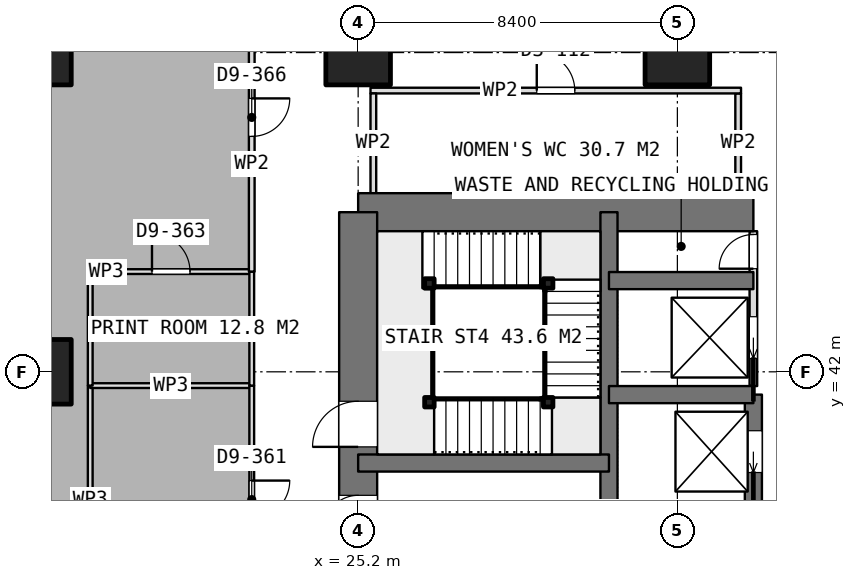
"""IFC4 building model, lengths in metres.
Left out: names, types, materials, properties, quantities, classifications, styles, units other than length and angle.
Written with IfcOpenShell. Run it as: python <this file> out.ifc"""

import sys

from ifc_helpers import new_model, si_unit, direction, frame, frame_2d, origin, origin_2d, place, context, subcontext, project, spatial, rectangle, extrude, element, fill, save


model = new_model("IFC4")
c1 = context("Model", 3, precision=1e-05, world=origin(), true_north=direction((0.0, 1.0)))
c2 = subcontext(c1, "Body", "Model", "MODEL_VIEW")
j1 = project(units=[si_unit("LENGTHUNIT", "METRE"), si_unit("PLANEANGLEUNIT", "RADIAN")], contexts=[c1])
p1 = place(None, origin())
s1 = spatial("IfcSite", under=j1, at=p1, CompositionType="ELEMENT")
p2 = place(p1, origin())
s2 = spatial("IfcBuilding", under=s1, at=p2, CompositionType="ELEMENT")
p3 = place(p2, frame((0.0, 0.0, 106.55)))
s3 = spatial("IfcBuildingStorey", under=s2, at=p3, CompositionType="ELEMENT", Elevation=106.55)
p4 = place(p3, frame((25.2, 46.2, 0.0), z_axis=(0.0, 0.0, 1.0), x_axis=(1.0, 0.0, 0.0)))
e1 = element("IfcWall", 1, at=p4, inside=s3, PredefinedType="SHEAR", context=c2, shape_type="SweptSolid", body=[
    extrude(rectangle(XDim=10.4, YDim=1.0, at=frame_2d((5.2, 0.0))), origin(), (0.0, 0.0, 1.0), 3.75),
])
p5 = place(p3, frame((25.2, 21.0, 0.0), z_axis=(0.0, 0.0, 1.0), x_axis=(0.0, 1.0, 0.0)))
e2 = element("IfcWall", 2, at=p5, inside=s3, PredefinedType="SHEAR", context=c2, shape_type="SweptSolid", body=[
    extrude(rectangle(XDim=25.2, YDim=1.0, at=frame_2d((12.6, 0.0))), origin(), (0.0, 0.0, 1.0), 3.75),
])
p6 = place(p5, frame((7.8, 0.0, 0.0)))
e3 = element("IfcOpeningElement", 3, at=p6, cuts=e2, PredefinedType="OPENING", context=c2, shape_type="SweptSolid", body=[
    extrude(rectangle(XDim=1.2, YDim=2.1, at=frame_2d((0.6, 1.05))), frame((0.0, 0.51, 0.0), z_axis=(0.0, -1.0, 0.0), x_axis=(1.0, 0.0, 0.0)), (0.0, 0.0, 1.0), 1.02),
])
p7 = place(p5, frame((14.25, 0.0, 0.0)))
e4 = element("IfcOpeningElement", 4, at=p7, cuts=e2, PredefinedType="OPENING", context=c2, shape_type="SweptSolid", body=[
    extrude(rectangle(XDim=0.9, YDim=2.1, at=frame_2d((0.45, 1.05))), frame((0.0, 0.51, 0.0), z_axis=(0.0, -1.0, 0.0), x_axis=(1.0, 0.0, 0.0)), (0.0, 0.0, 1.0), 1.02),
])
p8 = place(p5, frame((16.85, 0.0, 0.0)))
e5 = element("IfcOpeningElement", 5, at=p8, cuts=e2, PredefinedType="OPENING", context=c2, shape_type="SweptSolid", body=[
    extrude(rectangle(XDim=0.9, YDim=2.1, at=frame_2d((0.45, 1.05))), frame((0.0, 0.51, 0.0), z_axis=(0.0, -1.0, 0.0), x_axis=(1.0, 0.0, 0.0)), (0.0, 0.0, 1.0), 1.02),
])
p9 = place(p5, frame((19.025, 0.0, 0.0)))
e6 = element("IfcOpeningElement", 6, at=p9, cuts=e2, PredefinedType="OPENING", context=c2, shape_type="SweptSolid", body=[
    extrude(rectangle(XDim=1.2, YDim=2.1, at=frame_2d((0.6, 1.05))), frame((0.0, 0.51, 0.0), z_axis=(0.0, -1.0, 0.0), x_axis=(1.0, 0.0, 0.0)), (0.0, 0.0, 1.0), 1.02),
])
p10 = place(p3, frame((31.8, 21.0, 0.0), z_axis=(0.0, 0.0, 1.0), x_axis=(0.0, 1.0, 0.0)))
e7 = element("IfcWall", 7, at=p10, inside=s3, PredefinedType="SHEAR", context=c2, shape_type="SweptSolid", body=[
    extrude(rectangle(XDim=25.2, YDim=0.45, at=frame_2d((12.6, 0.0))), origin(), (0.0, 0.0, 1.0), 3.75),
])
p11 = place(p3, frame((35.6, 23.4, 0.0), z_axis=(0.0, 0.0, 1.0), x_axis=(0.0, 1.0, 0.0)))
e8 = element("IfcWall", 8, at=p11, inside=s3, PredefinedType="SHEAR", context=c2, shape_type="SweptSolid", body=[
    extrude(rectangle(XDim=18.0, YDim=0.45, at=frame_2d((9.0, 0.0))), origin(), (0.0, 0.0, 1.0), 3.75),
])
p12 = place(p11, frame((0.95, 0.0, 0.0)))
e9 = element("IfcOpeningElement", 9, at=p12, cuts=e8, PredefinedType="OPENING", context=c2, shape_type="SweptSolid", body=[
    extrude(rectangle(XDim=1.1, YDim=2.1, at=frame_2d((0.55, 1.05))), frame((0.0, 0.235, 0.0), z_axis=(0.0, -1.0, 0.0), x_axis=(1.0, 0.0, 0.0)), (0.0, 0.0, 1.0), 0.47),
])
p13 = place(p11, frame((3.95, 0.0, 0.0)))
e10 = element("IfcOpeningElement", 10, at=p13, cuts=e8, PredefinedType="OPENING", context=c2, shape_type="SweptSolid", body=[
    extrude(rectangle(XDim=1.1, YDim=2.1, at=frame_2d((0.55, 1.05))), frame((0.0, 0.235, 0.0), z_axis=(0.0, -1.0, 0.0), x_axis=(1.0, 0.0, 0.0)), (0.0, 0.0, 1.0), 0.47),
])
p14 = place(p11, frame((6.95, 0.0, 0.0)))
e11 = element("IfcOpeningElement", 11, at=p14, cuts=e8, PredefinedType="OPENING", context=c2, shape_type="SweptSolid", body=[
    extrude(rectangle(XDim=1.1, YDim=2.1, at=frame_2d((0.55, 1.05))), frame((0.0, 0.235, 0.0), z_axis=(0.0, -1.0, 0.0), x_axis=(1.0, 0.0, 0.0)), (0.0, 0.0, 1.0), 0.47),
])
p15 = place(p11, frame((9.95, 0.0, 0.0)))
e12 = element("IfcOpeningElement", 12, at=p15, cuts=e8, PredefinedType="OPENING", context=c2, shape_type="SweptSolid", body=[
    extrude(rectangle(XDim=1.1, YDim=2.1, at=frame_2d((0.55, 1.05))), frame((0.0, 0.235, 0.0), z_axis=(0.0, -1.0, 0.0), x_axis=(1.0, 0.0, 0.0)), (0.0, 0.0, 1.0), 0.47),
])
p16 = place(p11, frame((12.95, 0.0, 0.0)))
e13 = element("IfcOpeningElement", 13, at=p16, cuts=e8, PredefinedType="OPENING", context=c2, shape_type="SweptSolid", body=[
    extrude(rectangle(XDim=1.1, YDim=2.1, at=frame_2d((0.55, 1.05))), frame((0.0, 0.235, 0.0), z_axis=(0.0, -1.0, 0.0), x_axis=(1.0, 0.0, 0.0)), (0.0, 0.0, 1.0), 0.47),
])
p17 = place(p11, frame((15.95, 0.0, 0.0)))
e14 = element("IfcOpeningElement", 14, at=p17, cuts=e8, PredefinedType="OPENING", context=c2, shape_type="SweptSolid", body=[
    extrude(rectangle(XDim=1.1, YDim=2.1, at=frame_2d((0.55, 1.05))), frame((0.0, 0.235, 0.0), z_axis=(0.0, -1.0, 0.0), x_axis=(1.0, 0.0, 0.0)), (0.0, 0.0, 1.0), 0.47),
])
for number, where, z_axis, x_axis in (
    (15, (31.8, 41.4, 0.0), (0.0, 0.0, 1.0), (1.0, 0.0, 0.0)),
    (16, (31.8, 44.4, 0.0), (0.0, 0.0, 1.0), (1.0, 0.0, 0.0)),
):
    element("IfcWall", number, at=place(p3, frame(where, z_axis=z_axis, x_axis=x_axis)), inside=s3, PredefinedType="SHEAR", context=c2, shape_type="SweptSolid", body=[
        extrude(rectangle(XDim=3.8, YDim=0.45, at=frame_2d((1.9, 0.0))), origin(), (0.0, 0.0, 1.0), 3.75),
    ])
p18 = place(p3, frame((25.2, 39.6, 0.0), z_axis=(0.0, 0.0, 1.0), x_axis=(1.0, 0.0, 0.0)))
e17 = element("IfcWall", 17, at=p18, inside=s3, PredefinedType="SHEAR", context=c2, shape_type="SweptSolid", body=[
    extrude(rectangle(XDim=6.6, YDim=0.45, at=frame_2d((3.3, 0.0))), origin(), (0.0, 0.0, 1.0), 3.75),
])
for number, where, z_axis, x_axis in (
    (18, (16.8, 42.0, 0.0), (0.0, 0.0, 1.0), (1.0, 0.0, 0.0)),
    (19, (16.8, 50.4, 0.0), (0.0, 0.0, 1.0), (1.0, 0.0, 0.0)),
    (20, (25.2, 50.4, 0.0), (0.0, 0.0, 1.0), (1.0, 0.0, 0.0)),
    (21, (33.6, 50.4, 0.0), (0.0, 0.0, 1.0), (1.0, 0.0, 0.0)),
):
    element("IfcColumn", number, at=place(p3, frame(where, z_axis=z_axis, x_axis=x_axis)), inside=s3, PredefinedType="COLUMN", context=c2, shape_type="SweptSolid", body=[
        extrude(rectangle(XDim=1.7, YDim=1.7, at=origin_2d()), origin(), (0.0, 0.0, 1.0), 3.75),
    ])
p19 = place(p3, frame((35.6, 41.625, 0.0), z_axis=(0.0, 0.0, 1.0), x_axis=(0.0, 1.0, 0.0)))
e22 = element("IfcWall", 22, at=p19, inside=s3, PredefinedType="PARTITIONING", context=c2, shape_type="SweptSolid", body=[
    extrude(rectangle(XDim=4.075, YDim=0.2, at=frame_2d((2.038, 0.0))), origin(), (0.0, 0.0, 1.0), 3.5),
])
p20 = place(p19, frame((3.088, 0.0, 0.0)))
e23 = element("IfcOpeningElement", 23, at=p20, cuts=e22, PredefinedType="OPENING", context=c2, shape_type="SweptSolid", body=[
    extrude(rectangle(XDim=0.9, YDim=2.1, at=frame_2d((0.45, 1.05))), frame((0.0, 0.11, 0.0), z_axis=(0.0, -1.0, 0.0), x_axis=(1.0, 0.0, 0.0)), (0.0, 0.0, 1.0), 0.22),
])
p21 = place(p19, frame((0.725, 0.0, 0.0)))
e24 = element("IfcOpeningElement", 24, at=p21, cuts=e22, PredefinedType="OPENING", context=c2, shape_type="SweptSolid", body=[
    extrude(rectangle(XDim=1.1, YDim=2.1, at=frame_2d((0.55, 1.05))), frame((0.0, 0.11, 0.0), z_axis=(0.0, -1.0, 0.0), x_axis=(1.0, 0.0, 0.0)), (0.0, 0.0, 1.0), 0.22),
])
p22 = place(p3, frame((25.525, 49.4, 0.0), z_axis=(0.0, 0.0, 1.0), x_axis=(1.0, 0.0, 0.0)))
e25 = element("IfcWall", 25, at=p22, inside=s3, PredefinedType="PARTITIONING", context=c2, shape_type="SweptSolid", body=[
    extrude(rectangle(XDim=9.75, YDim=0.15, at=frame_2d((4.875, 0.0))), origin(), (0.0, 0.0, 1.0), 3.5),
])
p23 = place(p22, frame((4.375, 0.0, 0.0)))
e26 = element("IfcOpeningElement", 26, at=p23, cuts=e25, PredefinedType="OPENING", context=c2, shape_type="SweptSolid", body=[
    extrude(rectangle(XDim=1.0, YDim=2.1, at=frame_2d((0.5, 1.05))), frame((0.0, 0.085, 0.0), z_axis=(0.0, -1.0, 0.0), x_axis=(1.0, 0.0, 0.0)), (0.0, 0.0, 1.0), 0.17),
])
for number, where, z_axis, x_axis in (
    (27, (25.6, 46.7, 0.0), (0.0, 0.0, 1.0), (0.0, 1.0, 0.0)),
    (28, (35.2, 46.7, 0.0), (0.0, 0.0, 1.0), (0.0, 1.0, 0.0)),
):
    element("IfcWall", number, at=place(p3, frame(where, z_axis=z_axis, x_axis=x_axis)), inside=s3, PredefinedType="PARTITIONING", context=c2, shape_type="SweptSolid", body=[
        extrude(rectangle(XDim=2.625, YDim=0.15, at=frame_2d((1.312, 0.0))), origin(), (0.0, 0.0, 1.0), 3.5),
    ])
p24 = place(p3, frame((18.15, 35.638, 0.0), z_axis=(0.0, 0.0, 1.0), x_axis=(0.0, 1.0, 0.0)))
e29 = element("IfcWall", 29, at=p24, inside=s3, PredefinedType="PARTITIONING", context=c2, shape_type="SweptSolid", body=[
    extrude(rectangle(XDim=5.999, YDim=0.125, at=frame_2d((3.0, 0.0))), origin(), (0.0, 0.0, 1.0), 3.5),
])
p25 = place(p3, frame((18.15, 41.637, 0.0), z_axis=(0.0, 0.0, 1.0), x_axis=(1.0, 0.0, 0.0)))
e30 = element("IfcWall", 30, at=p25, inside=s3, PredefinedType="PARTITIONING", context=c2, shape_type="SweptSolid", body=[
    extrude(rectangle(XDim=4.25, YDim=0.125, at=frame_2d((2.125, 0.0))), origin(), (0.0, 0.0, 1.0), 3.5),
])
p26 = place(p3, frame((22.4, 41.637, 0.0), z_axis=(0.0, 0.0, 1.0), x_axis=(0.0, -1.0, 0.0)))
e31 = element("IfcWall", 31, at=p26, inside=s3, PredefinedType="PARTITIONING", context=c2, shape_type="SweptSolid", body=[
    extrude(rectangle(XDim=5.999, YDim=0.125, at=frame_2d((3.0, 0.0))), origin(), (0.0, 0.0, 1.0), 3.5),
])
p27 = place(p26, frame((2.499, 0.0, 0.0)))
e32 = element("IfcOpeningElement", 32, at=p27, cuts=e31, PredefinedType="OPENING", context=c2, shape_type="SweptSolid", body=[
    extrude(rectangle(XDim=1.0, YDim=2.1, at=frame_2d((0.5, 1.05))), frame((0.0, 0.073, 0.0), z_axis=(0.0, -1.0, 0.0), x_axis=(1.0, 0.0, 0.0)), (0.0, 0.0, 1.0), 0.145),
])
p28 = place(p3, frame((18.15, 41.637, 0.0), z_axis=(0.0, 0.0, 1.0), x_axis=(0.0, 1.0, 0.0)))
e33 = element("IfcWall", 33, at=p28, inside=s3, PredefinedType="PARTITIONING", context=c2, shape_type="SweptSolid", body=[
    extrude(rectangle(XDim=3.0, YDim=0.125, at=frame_2d((1.5, 0.0))), origin(), (0.0, 0.0, 1.0), 3.5),
])
p29 = place(p3, frame((18.15, 44.637, 0.0), z_axis=(0.0, 0.0, 1.0), x_axis=(1.0, 0.0, 0.0)))
e34 = element("IfcWall", 34, at=p29, inside=s3, PredefinedType="PARTITIONING", context=c2, shape_type="SweptSolid", body=[
    extrude(rectangle(XDim=4.25, YDim=0.125, at=frame_2d((2.125, 0.0))), origin(), (0.0, 0.0, 1.0), 3.5),
])
p30 = place(p29, frame((1.625, 0.0, 0.0)))
e35 = element("IfcOpeningElement", 35, at=p30, cuts=e34, PredefinedType="OPENING", context=c2, shape_type="SweptSolid", body=[
    extrude(rectangle(XDim=1.0, YDim=2.1, at=frame_2d((0.5, 1.05))), frame((0.0, 0.073, 0.0), z_axis=(0.0, -1.0, 0.0), x_axis=(1.0, 0.0, 0.0)), (0.0, 0.0, 1.0), 0.145),
])
p31 = place(p3, frame((22.4, 44.637, 0.0), z_axis=(0.0, 0.0, 1.0), x_axis=(0.0, -1.0, 0.0)))
e36 = element("IfcWall", 36, at=p31, inside=s3, PredefinedType="PARTITIONING", context=c2, shape_type="SweptSolid", body=[
    extrude(rectangle(XDim=3.0, YDim=0.125, at=frame_2d((1.5, 0.0))), origin(), (0.0, 0.0, 1.0), 3.5),
])
p32 = place(p3, frame((22.4, 52.75, 0.0), z_axis=(0.0, 0.0, 1.0), x_axis=(0.0, -1.0, 0.0)))
e37 = element("IfcWall", 37, at=p32, inside=s3, PredefinedType="PARTITIONING", context=c2, shape_type="SweptSolid", body=[
    extrude(rectangle(XDim=8.113, YDim=0.15, at=frame_2d((4.057, 0.0))), origin(), (0.0, 0.0, 1.0), 3.5),
])
p33 = place(p32, frame((3.556, 0.0, 0.0)))
e38 = element("IfcOpeningElement", 38, at=p33, cuts=e37, PredefinedType="OPENING", context=c2, shape_type="SweptSolid", body=[
    extrude(rectangle(XDim=1.0, YDim=2.1, at=frame_2d((0.5, 1.05))), frame((0.0, 0.085, 0.0), z_axis=(0.0, -1.0, 0.0), x_axis=(1.0, 0.0, 0.0)), (0.0, 0.0, 1.0), 0.17),
])
for number, where, z_axis, x_axis in (
    (39, (27.075, 41.2, 0.0), (0.0, 0.0, 1.0), (1.0, 0.0, 0.0)),
    (40, (30.2, 41.2, 0.0), (0.0, 0.0, 1.0), (1.0, 0.0, 0.0)),
    (41, (30.2, 44.325, 0.0), (0.0, 0.0, 1.0), (1.0, 0.0, 0.0)),
    (42, (27.075, 44.325, 0.0), (0.0, 0.0, 1.0), (1.0, 0.0, 0.0)),
):
    element("IfcColumn", number, at=place(p3, frame(where, z_axis=z_axis, x_axis=x_axis)), inside=s3, PredefinedType="COLUMN", context=c2, shape_type="SweptSolid", body=[
        extrude(rectangle(XDim=0.25, YDim=0.25, at=origin_2d()), origin(), (0.0, 0.0, 1.0), 3.75),
    ])
p34 = place(p8, origin())
e43 = element("IfcDoor", 43, at=p34, inside=s3, OperationType="SINGLE_SWING_LEFT", PredefinedType="DOOR", context=c2, shape_type="SweptSolid", body=[
    extrude(rectangle(XDim=0.9, YDim=2.1, at=frame_2d((0.45, 1.05))), frame((0.0, 0.025, 0.0), z_axis=(0.0, -1.0, 0.0), x_axis=(1.0, 0.0, 0.0)), (0.0, 0.0, 1.0), 0.05),
])
fill(e5, e43)
p35 = place(p20, origin())
e44 = element("IfcDoor", 44, at=p35, inside=s3, OperationType="SINGLE_SWING_LEFT", PredefinedType="DOOR", context=c2, shape_type="SweptSolid", body=[
    extrude(rectangle(XDim=0.9, YDim=2.1, at=frame_2d((0.45, 1.05))), frame((0.0, 0.025, 0.0), z_axis=(0.0, -1.0, 0.0), x_axis=(1.0, 0.0, 0.0)), (0.0, 0.0, 1.0), 0.05),
])
fill(e23, e44)
p36 = place(p17, origin())
e45 = element("IfcDoor", 45, at=p36, inside=s3, OperationType="SLIDING_TO_LEFT", PredefinedType="USERDEFINED", context=c2, shape_type="SweptSolid", body=[
    extrude(rectangle(XDim=1.1, YDim=2.1, at=frame_2d((0.55, 1.05))), frame((0.0, 0.025, 0.0), z_axis=(0.0, -1.0, 0.0), x_axis=(1.0, 0.0, 0.0)), (0.0, 0.0, 1.0), 0.05),
])
fill(e14, e45)
p37 = place(p21, origin())
e46 = element("IfcDoor", 46, at=p37, inside=s3, OperationType="SLIDING_TO_LEFT", PredefinedType="USERDEFINED", context=c2, shape_type="SweptSolid", body=[
    extrude(rectangle(XDim=1.1, YDim=2.1, at=frame_2d((0.55, 1.05))), frame((0.0, 0.025, 0.0), z_axis=(0.0, -1.0, 0.0), x_axis=(1.0, 0.0, 0.0)), (0.0, 0.0, 1.0), 0.05),
])
fill(e24, e46)
p38 = place(p23, origin())
e47 = element("IfcDoor", 47, at=p38, inside=s3, OperationType="SINGLE_SWING_LEFT", PredefinedType="DOOR", context=c2, shape_type="SweptSolid", body=[
    extrude(rectangle(XDim=1.0, YDim=2.1, at=frame_2d((0.5, 1.05))), frame((0.0, 0.025, 0.0), z_axis=(0.0, -1.0, 0.0), x_axis=(1.0, 0.0, 0.0)), (0.0, 0.0, 1.0), 0.05),
])
fill(e26, e47)
p39 = place(p27, origin())
e48 = element("IfcDoor", 48, at=p39, inside=s3, OperationType="SINGLE_SWING_LEFT", PredefinedType="DOOR", context=c2, shape_type="SweptSolid", body=[
    extrude(rectangle(XDim=1.0, YDim=2.1, at=frame_2d((0.5, 1.05))), frame((0.0, 0.025, 0.0), z_axis=(0.0, -1.0, 0.0), x_axis=(1.0, 0.0, 0.0)), (0.0, 0.0, 1.0), 0.05),
])
fill(e32, e48)
p40 = place(p30, origin())
e49 = element("IfcDoor", 49, at=p40, inside=s3, OperationType="SINGLE_SWING_LEFT", PredefinedType="DOOR", context=c2, shape_type="SweptSolid", body=[
    extrude(rectangle(XDim=1.0, YDim=2.1, at=frame_2d((0.5, 1.05))), frame((0.0, 0.025, 0.0), z_axis=(0.0, -1.0, 0.0), x_axis=(1.0, 0.0, 0.0)), (0.0, 0.0, 1.0), 0.05),
])
fill(e35, e49)
p41 = place(p33, origin())
e50 = element("IfcDoor", 50, at=p41, inside=s3, OperationType="SINGLE_SWING_LEFT", PredefinedType="DOOR", context=c2, shape_type="SweptSolid", body=[
    extrude(rectangle(XDim=1.0, YDim=2.1, at=frame_2d((0.5, 1.05))), frame((0.0, 0.025, 0.0), z_axis=(0.0, -1.0, 0.0), x_axis=(1.0, 0.0, 0.0)), (0.0, 0.0, 1.0), 0.05),
])
fill(e38, e50)
p42 = place(p9, origin())
e51 = element("IfcDoor", 51, at=p42, inside=s3, OperationType="SINGLE_SWING_RIGHT", PredefinedType="DOOR", context=c2, shape_type="SweptSolid", body=[
    extrude(rectangle(XDim=1.2, YDim=2.1, at=frame_2d((0.6, 1.05))), frame((0.0, 0.025, 0.0), z_axis=(0.0, -1.0, 0.0), x_axis=(1.0, 0.0, 0.0)), (0.0, 0.0, 1.0), 0.05),
])
fill(e6, e51)
save(model, sys.argv[1])
